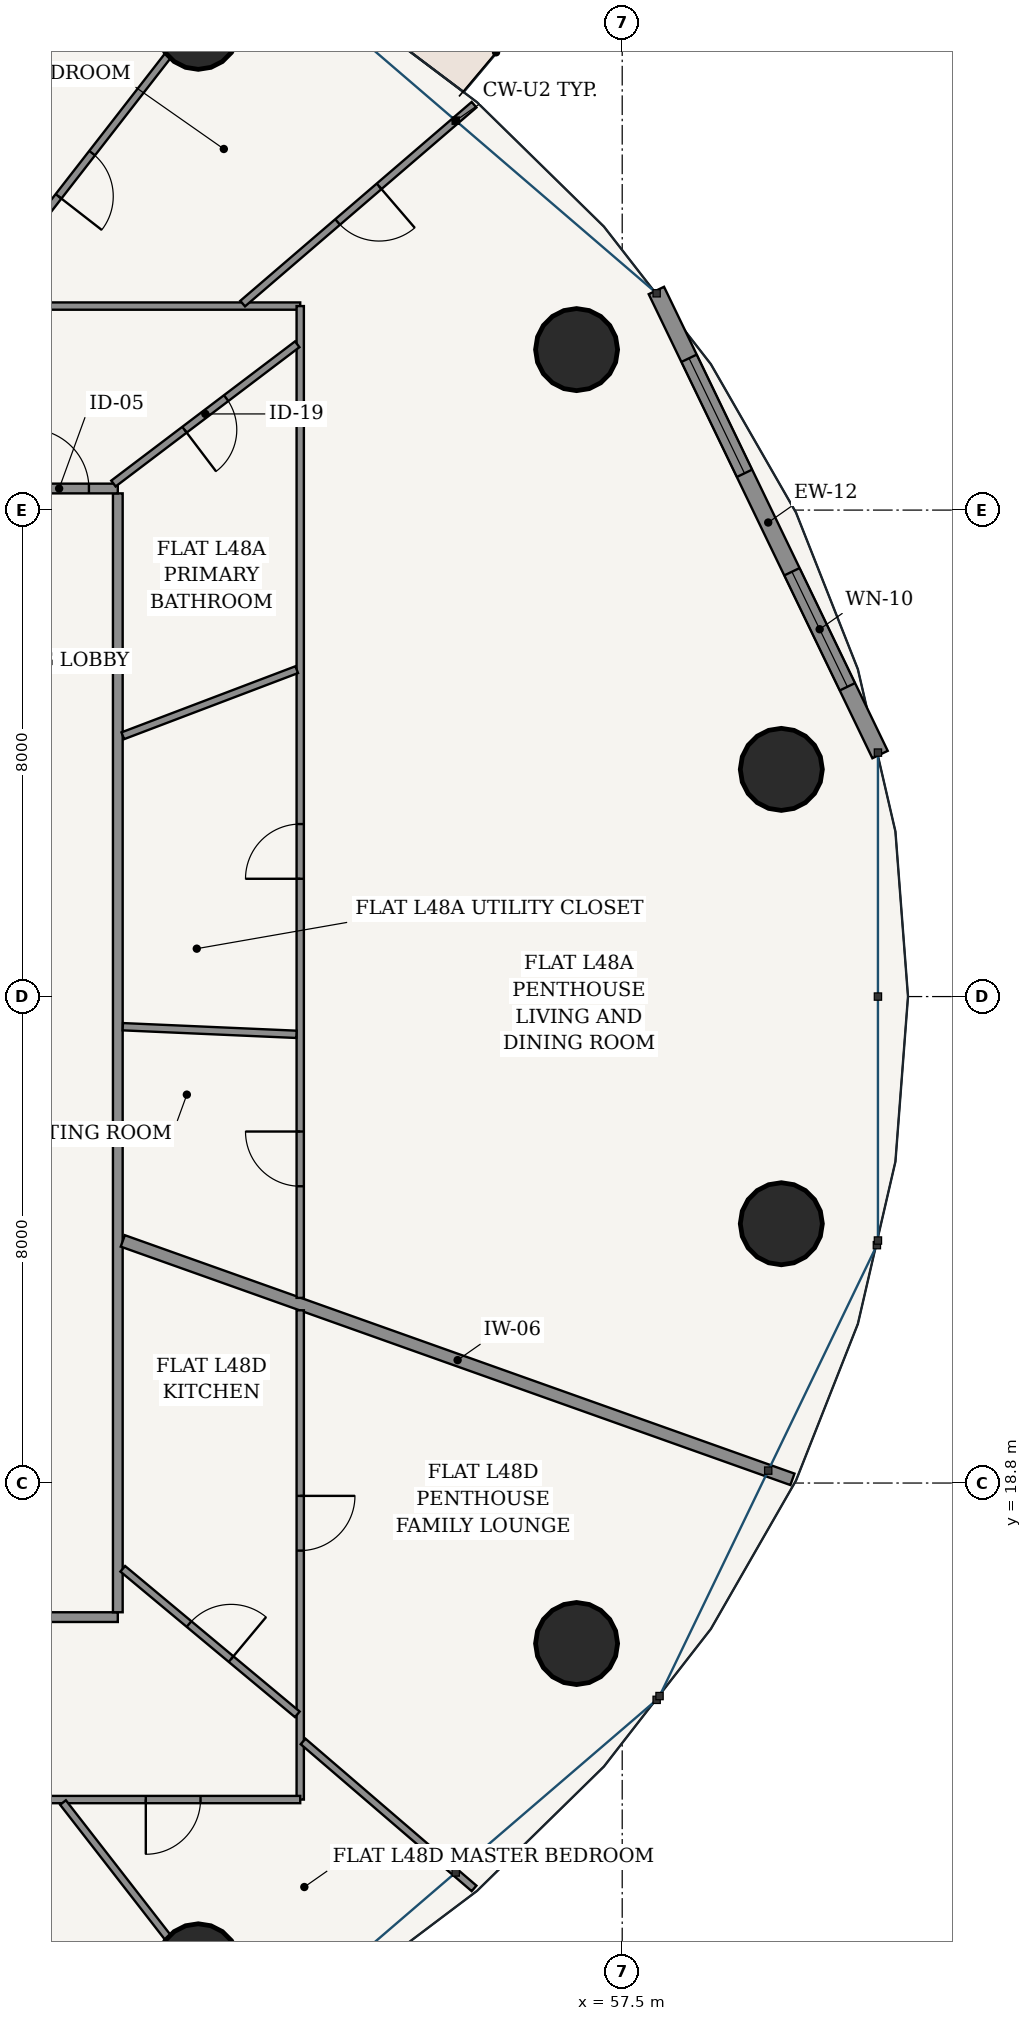
"""IFC4 building model, lengths in metres.
Left out: names, types, materials, properties, quantities, classifications, styles, units other than length and angle.
Written with IfcOpenShell. Run it as: python <this file> out.ifc"""

import sys

from ifc_helpers import new_model, si_unit, direction, frame, frame_2d, origin, origin_2d, place, context, subcontext, project, spatial, rectangle, hollow_circle, extrude, source, transform, mapped, element, fill, save


model = new_model("IFC4")
c1 = context("Model", 3, precision=1e-05, world=origin(), true_north=direction((-0.2419218956, 0.970295726276)))
c2 = subcontext(c1, "Body", "Model", "MODEL_VIEW")
j1 = project(units=[si_unit("LENGTHUNIT", "METRE"), si_unit("PLANEANGLEUNIT", "RADIAN")], contexts=[c1])
p1 = place(None, origin())
s1 = spatial("IfcSite", under=j1, at=p1, CompositionType="ELEMENT")
p2 = place(p1, origin())
s2 = spatial("IfcBuilding", under=s1, at=p2, CompositionType="ELEMENT")
p3 = place(p2, frame((0.0, 0.0, 182.2)))
s3 = spatial("IfcBuildingStorey", under=s2, at=p3, CompositionType="ELEMENT", Elevation=182.2)
for number, where, z_axis, x_axis in (
    (1, (60.117, 30.536, 0.0), (0.0, 0.0, 1.0), (1.0, 0.0, 0.0)),
    (2, (56.75, 37.439, 0.0), (0.0, 0.0, 1.0), (1.0, 0.0, 0.0)),
    (3, (50.528, 42.723, 0.0), (0.0, 0.0, 1.0), (1.0, 0.0, 0.0)),
    (4, (50.528, 10.877, 0.0), (0.0, 0.0, 1.0), (1.0, 0.0, 0.0)),
    (5, (56.75, 16.161, 0.0), (0.0, 0.0, 1.0), (1.0, 0.0, 0.0)),
    (6, (60.117, 23.064, 0.0), (0.0, 0.0, 1.0), (1.0, 0.0, 0.0)),
):
    element("IfcColumn", number, at=place(p3, frame(where, z_axis=z_axis, x_axis=x_axis)), inside=s3, PredefinedType="COLUMN", context=c2, shape_type="SweptSolid", body=[
        extrude(hollow_circle(Radius=0.675, WallThickness=0.042, at=origin_2d()), origin(), (0.0, 0.0, 1.0), 3.6),
    ])
p4 = place(p3, frame((61.74, 30.78, 0.0), z_axis=(0.0, 0.0, 1.0), x_axis=(-0.434209827226, 0.900811759437, 0.0)))
e7 = element("IfcWall", 7, at=p4, inside=s3, PredefinedType="SOLIDWALL", context=c2, shape_type="SweptSolid", body=[
    extrude(rectangle(XDim=8.472, YDim=0.28, at=frame_2d((4.236, 0.0))), origin(), (0.0, 0.0, 1.0), 3.15),
])
p5 = place(p4, frame((1.237, 0.0, 0.85)))
e8 = element("IfcOpeningElement", 8, at=p5, cuts=e7, PredefinedType="OPENING", context=c2, shape_type="SweptSolid", body=[
    extrude(rectangle(XDim=2.1, YDim=1.95, at=frame_2d((1.05, 0.975))), frame((0.0, 0.15, 0.0), z_axis=(0.0, -1.0, 0.0), x_axis=(1.0, 0.0, 0.0)), (0.0, 0.0, 1.0), 0.3),
])
p6 = place(p4, frame((5.134, 0.0, 0.85)))
e9 = element("IfcOpeningElement", 9, at=p6, cuts=e7, PredefinedType="OPENING", context=c2, shape_type="SweptSolid", body=[
    extrude(rectangle(XDim=2.1, YDim=1.95, at=frame_2d((1.05, 0.975))), frame((0.0, 0.15, 0.0), z_axis=(0.0, -1.0, 0.0), x_axis=(1.0, 0.0, 0.0)), (0.0, 0.0, 1.0), 0.3),
])
p7 = place(p3, frame((34.32, 16.595, 0.0), z_axis=(0.0, 0.0, 1.0), x_axis=(1.0, 0.0, 0.0)))
e10 = element("IfcWall", 10, at=p7, inside=s3, PredefinedType="PARTITIONING", context=c2, shape_type="SweptSolid", body=[
    extrude(rectangle(XDim=14.885, YDim=0.16, at=frame_2d((7.442, 0.0))), origin(), (0.0, 0.0, 1.0), 2.666),
])
p8 = place(p7, frame((10.026, 0.0, 0.0)))
e11 = element("IfcOpeningElement", 11, at=p8, cuts=e10, PredefinedType="OPENING", context=c2, shape_type="SweptSolid", body=[
    extrude(rectangle(XDim=0.98, YDim=2.2, at=frame_2d((0.49, 1.1))), frame((0.0, 0.09, 0.0), z_axis=(0.0, -1.0, 0.0), x_axis=(1.0, 0.0, 0.0)), (0.0, 0.0, 1.0), 0.18),
])
p9 = place(p3, frame((49.205, 16.675, 0.0), z_axis=(0.0, 0.0, 1.0), x_axis=(0.0, 1.0, 0.0)))
e12 = element("IfcWall", 12, at=p9, inside=s3, PredefinedType="PARTITIONING", context=c2, shape_type="SweptSolid", body=[
    extrude(rectangle(XDim=18.4, YDim=0.16, at=frame_2d((9.2, 0.0))), origin(), (0.0, 0.0, 1.0), 2.666),
])
p10 = place(p3, frame((47.275, 35.155, 0.0), z_axis=(0.0, 0.0, 1.0), x_axis=(1.0, 0.0, 0.0)))
e13 = element("IfcWall", 13, at=p10, inside=s3, PredefinedType="PARTITIONING", context=c2, shape_type="SweptSolid", body=[
    extrude(rectangle(XDim=1.93, YDim=0.16, at=frame_2d((0.965, 0.0))), origin(), (0.0, 0.0, 1.0), 3.15),
])
p11 = place(p10, frame((0.475, 0.0, 0.0)))
e14 = element("IfcOpeningElement", 14, at=p11, cuts=e13, PredefinedType="OPENING", context=c2, shape_type="SweptSolid", body=[
    extrude(rectangle(XDim=0.98, YDim=2.2, at=frame_2d((0.49, 1.1))), frame((0.0, 0.09, 0.0), z_axis=(0.0, -1.0, 0.0), x_axis=(1.0, 0.0, 0.0)), (0.0, 0.0, 1.0), 0.18),
])
p12 = place(p3, frame((49.287, 22.782, 0.0), z_axis=(0.0, 0.0, 1.0), x_axis=(0.942076460895, -0.335398183996, 0.0)))
e15 = element("IfcWall", 15, at=p12, inside=s3, PredefinedType="PARTITIONING", context=c2, shape_type="SweptSolid", body=[
    extrude(rectangle(XDim=11.689, YDim=0.2, at=frame_2d((5.845, 0.0))), origin(), (0.0, 0.0, 1.0), 2.666),
])
p13 = place(p3, frame((44.195, 38.155, 0.0), z_axis=(0.0, 0.0, 1.0), x_axis=(1.0, 0.0, 0.0)))
e16 = element("IfcWall", 16, at=p13, inside=s3, PredefinedType="PARTITIONING", context=c2, shape_type="SweptSolid", body=[
    extrude(rectangle(XDim=8.01, YDim=0.12, at=frame_2d((4.005, 0.0))), origin(), (0.0, 0.0, 1.0), 2.666),
])
p14 = place(p13, frame((1.018, 0.0, 0.0)))
e17 = element("IfcOpeningElement", 17, at=p14, cuts=e16, PredefinedType="OPENING", context=c2, shape_type="SweptSolid", body=[
    extrude(rectangle(XDim=0.9, YDim=2.15, at=frame_2d((0.45, 1.075))), frame((0.0, 0.07, 0.0), z_axis=(0.0, -1.0, 0.0), x_axis=(1.0, 0.0, 0.0)), (0.0, 0.0, 1.0), 0.14),
])
p15 = place(p3, frame((52.205, 38.155, 0.0), z_axis=(0.0, 0.0, 1.0), x_axis=(0.0, -1.0, 0.0)))
e18 = element("IfcWall", 18, at=p15, inside=s3, PredefinedType="PARTITIONING", context=c2, shape_type="SweptSolid", body=[
    extrude(rectangle(XDim=16.31, YDim=0.12, at=frame_2d((8.155, 0.0))), origin(), (0.0, 0.0, 1.0), 2.666),
])
p16 = place(p15, frame((13.574, 0.0, 0.0)))
e19 = element("IfcOpeningElement", 19, at=p16, cuts=e18, PredefinedType="OPENING", context=c2, shape_type="SweptSolid", body=[
    extrude(rectangle(XDim=0.9, YDim=2.15, at=frame_2d((0.45, 1.075))), frame((0.0, 0.07, 0.0), z_axis=(0.0, -1.0, 0.0), x_axis=(1.0, 0.0, 0.0)), (0.0, 0.0, 1.0), 0.14),
])
p17 = place(p15, frame((8.518, 0.0, 0.0)))
e20 = element("IfcOpeningElement", 20, at=p17, cuts=e18, PredefinedType="OPENING", context=c2, shape_type="SweptSolid", body=[
    extrude(rectangle(XDim=0.9, YDim=2.15, at=frame_2d((0.45, 1.075))), frame((0.0, 0.07, 0.0), z_axis=(0.0, -1.0, 0.0), x_axis=(1.0, 0.0, 0.0)), (0.0, 0.0, 1.0), 0.14),
])
p18 = place(p3, frame((51.258, 38.195, 0.0), z_axis=(0.0, 0.0, 1.0), x_axis=(0.758369880373, 0.651824458381, 0.0)))
e21 = element("IfcWall", 21, at=p18, inside=s3, PredefinedType="PARTITIONING", context=c2, shape_type="SweptSolid", body=[
    extrude(rectangle(XDim=5.018, YDim=0.12, at=frame_2d((2.509, 0.0))), origin(), (0.0, 0.0, 1.0), 2.666),
])
p19 = place(p18, frame((2.059, 0.0, 0.0)))
e22 = element("IfcOpeningElement", 22, at=p19, cuts=e21, PredefinedType="OPENING", context=c2, shape_type="SweptSolid", body=[
    extrude(rectangle(XDim=0.9, YDim=2.15, at=frame_2d((0.45, 1.075))), frame((0.0, 0.07, 0.0), z_axis=(0.0, -1.0, 0.0), x_axis=(1.0, 0.0, 0.0)), (0.0, 0.0, 1.0), 0.14),
])
p20 = place(p3, frame((46.865, 38.204, 0.0), z_axis=(0.0, 0.0, 1.0), x_axis=(0.613754405153, 0.789497010859, 0.0)))
e23 = element("IfcWall", 23, at=p20, inside=s3, PredefinedType="PARTITIONING", context=c2, shape_type="SweptSolid", body=[
    extrude(rectangle(XDim=7.353, YDim=0.12, at=frame_2d((3.677, 0.0))), origin(), (0.0, 0.0, 1.0), 2.5),
])
p21 = place(p20, frame((2.224, 0.0, 0.0)))
e24 = element("IfcOpeningElement", 24, at=p21, cuts=e23, PredefinedType="OPENING", context=c2, shape_type="SweptSolid", body=[
    extrude(rectangle(XDim=0.9, YDim=2.15, at=frame_2d((0.45, 1.075))), frame((0.0, 0.07, 0.0), z_axis=(0.0, -1.0, 0.0), x_axis=(1.0, 0.0, 0.0)), (0.0, 0.0, 1.0), 0.14),
])
p22 = place(p3, frame((49.287, 26.304, 0.0), z_axis=(0.0, 0.0, 1.0), x_axis=(0.999039813392, -0.043811542509, 0.0)))
e25 = element("IfcWall", 25, at=p22, inside=s3, PredefinedType="PARTITIONING", context=c2, shape_type="SweptSolid", body=[
    extrude(rectangle(XDim=2.859, YDim=0.12, at=frame_2d((1.429, 0.0))), origin(), (0.0, 0.0, 1.0), 3.15),
])
p23 = place(p3, frame((49.287, 31.089, 0.0), z_axis=(0.0, 0.0, 1.0), x_axis=(0.934802126635, 0.3551689514, 0.0)))
e26 = element("IfcWall", 26, at=p23, inside=s3, PredefinedType="PARTITIONING", context=c2, shape_type="SweptSolid", body=[
    extrude(rectangle(XDim=3.06, YDim=0.12, at=frame_2d((1.53, 0.0))), origin(), (0.0, 0.0, 1.0), 2.825),
])
p24 = place(p3, frame((49.133, 35.236, 0.0), z_axis=(0.0, 0.0, 1.0), x_axis=(0.797054583929, 0.603907269568, 0.0)))
e27 = element("IfcWall", 27, at=p24, inside=s3, PredefinedType="PARTITIONING", context=c2, shape_type="SweptSolid", body=[
    extrude(rectangle(XDim=3.792, YDim=0.12, at=frame_2d((1.896, 0.0))), origin(), (0.0, 0.0, 1.0), 2.825),
])
p25 = place(p24, frame((1.466, 0.0, 0.0)))
e28 = element("IfcOpeningElement", 28, at=p25, cuts=e27, PredefinedType="OPENING", context=c2, shape_type="SweptSolid", body=[
    extrude(rectangle(XDim=0.86, YDim=2.15, at=frame_2d((0.43, 1.075))), frame((0.0, 0.07, 0.0), z_axis=(0.0, -1.0, 0.0), x_axis=(1.0, 0.0, 0.0)), (0.0, 0.0, 1.0), 0.14),
])
p26 = place(p3, frame((52.205, 21.641, 0.0), z_axis=(0.0, 0.0, 1.0), x_axis=(0.0, -1.0, 0.0)))
e29 = element("IfcWall", 29, at=p26, inside=s3, PredefinedType="PARTITIONING", context=c2, shape_type="SweptSolid", body=[
    extrude(rectangle(XDim=8.046, YDim=0.12, at=frame_2d((4.023, 0.0))), origin(), (0.0, 0.0, 1.0), 2.666),
])
p27 = place(p26, frame((3.052, 0.0, 0.0)))
e30 = element("IfcOpeningElement", 30, at=p27, cuts=e29, PredefinedType="OPENING", context=c2, shape_type="SweptSolid", body=[
    extrude(rectangle(XDim=0.9, YDim=2.15, at=frame_2d((0.45, 1.075))), frame((0.0, 0.07, 0.0), z_axis=(0.0, -1.0, 0.0), x_axis=(1.0, 0.0, 0.0)), (0.0, 0.0, 1.0), 0.14),
])
p28 = place(p3, frame((52.205, 13.595, 0.0), z_axis=(0.0, 0.0, 1.0), x_axis=(-1.0, 0.0, 0.0)))
e31 = element("IfcWall", 31, at=p28, inside=s3, PredefinedType="PARTITIONING", context=c2, shape_type="SweptSolid", body=[
    extrude(rectangle(XDim=17.159, YDim=0.12, at=frame_2d((8.58, 0.0))), origin(), (0.0, 0.0, 1.0), 2.666),
])
p29 = place(p28, frame((6.879, 0.0, 0.0)))
e32 = element("IfcOpeningElement", 32, at=p29, cuts=e31, PredefinedType="OPENING", context=c2, shape_type="SweptSolid", body=[
    extrude(rectangle(XDim=0.9, YDim=2.15, at=frame_2d((0.45, 1.075))), frame((0.0, 0.07, 0.0), z_axis=(0.0, -1.0, 0.0), x_axis=(1.0, 0.0, 0.0)), (0.0, 0.0, 1.0), 0.14),
])
p30 = place(p28, frame((1.64, 0.0, 0.0)))
e33 = element("IfcOpeningElement", 33, at=p30, cuts=e31, PredefinedType="OPENING", context=c2, shape_type="SweptSolid", body=[
    extrude(rectangle(XDim=0.9, YDim=2.15, at=frame_2d((0.45, 1.075))), frame((0.0, 0.07, 0.0), z_axis=(0.0, -1.0, 0.0), x_axis=(1.0, 0.0, 0.0)), (0.0, 0.0, 1.0), 0.14),
])
p31 = place(p3, frame((48.304, 13.546, 0.0), z_axis=(0.0, 0.0, 1.0), x_axis=(0.613734792328, -0.789512257464, 0.0)))
e34 = element("IfcWall", 34, at=p31, inside=s3, PredefinedType="PARTITIONING", context=c2, shape_type="SweptSolid", body=[
    extrude(rectangle(XDim=5.01, YDim=0.12, at=frame_2d((2.505, 0.0))), origin(), (0.0, 0.0, 1.0), 2.5),
])
p32 = place(p3, frame((52.252, 14.55, 0.0), z_axis=(0.0, 0.0, 1.0), x_axis=(0.758368113794, -0.651826513714, 0.0)))
e35 = element("IfcWall", 35, at=p32, inside=s3, PredefinedType="PARTITIONING", context=c2, shape_type="SweptSolid", body=[
    extrude(rectangle(XDim=3.708, YDim=0.12, at=frame_2d((1.854, 0.0))), origin(), (0.0, 0.0, 1.0), 2.666),
])
p33 = place(p3, frame((49.287, 17.39, 0.0), z_axis=(0.0, 0.0, 1.0), x_axis=(0.768065994597, -0.640370695725, 0.0)))
e36 = element("IfcWall", 36, at=p33, inside=s3, PredefinedType="PARTITIONING", context=c2, shape_type="SweptSolid", body=[
    extrude(rectangle(XDim=3.738, YDim=0.12, at=frame_2d((1.869, 0.0))), origin(), (0.0, 0.0, 1.0), 2.825),
])
p34 = place(p33, frame((1.419, 0.0, 0.0)))
e37 = element("IfcOpeningElement", 37, at=p34, cuts=e36, PredefinedType="OPENING", context=c2, shape_type="SweptSolid", body=[
    extrude(rectangle(XDim=0.9, YDim=2.15, at=frame_2d((0.45, 1.075))), frame((0.0, 0.07, 0.0), z_axis=(0.0, -1.0, 0.0), x_axis=(1.0, 0.0, 0.0)), (0.0, 0.0, 1.0), 0.14),
])
m1 = source(origin(), c2, "Body", "SweptSolid", [
    extrude(rectangle(XDim=2.1, YDim=1.95, at=frame_2d((1.05, 0.975))), frame((0.0, 0.03, 0.0), z_axis=(0.0, -1.0, 0.0), x_axis=(1.0, 0.0, 0.0)), (0.0, 0.0, 1.0), 0.06),
])
p35 = place(p5, origin())
e38 = element("IfcWindow", 38, at=p35, inside=s3, PartitioningType="SINGLE_PANEL", PredefinedType="WINDOW", context=c2, shape_type="MappedRepresentation", body=[
    mapped(m1, transform((0.0, 0.0, 0.0), scale=1.0)),
])
fill(e8, e38)
p36 = place(p6, origin())
e39 = element("IfcWindow", 39, at=p36, inside=s3, PartitioningType="SINGLE_PANEL", PredefinedType="WINDOW", context=c2, shape_type="MappedRepresentation", body=[
    mapped(m1, transform((0.0, 0.0, 0.0), scale=1.0)),
])
fill(e9, e39)
m2 = source(origin(), c2, "Body", "SweptSolid", [
    extrude(rectangle(XDim=0.98, YDim=2.2, at=frame_2d((0.49, 1.1))), frame((0.0, 0.025, 0.0), z_axis=(0.0, -1.0, 0.0), x_axis=(1.0, 0.0, 0.0)), (0.0, 0.0, 1.0), 0.05),
])
p37 = place(p11, origin())
e40 = element("IfcDoor", 40, at=p37, inside=s3, OperationType="SINGLE_SWING_LEFT", PredefinedType="DOOR", context=c2, shape_type="MappedRepresentation", body=[
    mapped(m2, transform((0.0, 0.0, 0.0), scale=1.0)),
])
fill(e14, e40)
m3 = source(origin(), c2, "Body", "SweptSolid", [
    extrude(rectangle(XDim=0.86, YDim=2.15, at=frame_2d((0.43, 1.075))), frame((0.0, 0.025, 0.0), z_axis=(0.0, -1.0, 0.0), x_axis=(1.0, 0.0, 0.0)), (0.0, 0.0, 1.0), 0.05),
])
p38 = place(p25, frame((0.86, 0.0, 0.0), z_axis=(0.0, 0.0, 1.0), x_axis=(-1.0, 0.0, 0.0)))
e41 = element("IfcDoor", 41, at=p38, inside=s3, OperationType="SINGLE_SWING_RIGHT", PredefinedType="DOOR", context=c2, shape_type="MappedRepresentation", body=[
    mapped(m3, transform((0.0, 0.0, 0.0), scale=1.0)),
])
fill(e28, e41)
m4 = source(origin(), c2, "Body", "SweptSolid", [
    extrude(rectangle(XDim=0.9, YDim=2.15, at=frame_2d((0.45, 1.075))), frame((0.0, 0.025, 0.0), z_axis=(0.0, -1.0, 0.0), x_axis=(1.0, 0.0, 0.0)), (0.0, 0.0, 1.0), 0.05),
])
p39 = place(p21, frame((0.9, 0.0, 0.0), z_axis=(0.0, 0.0, 1.0), x_axis=(-1.0, 0.0, 0.0)))
e42 = element("IfcDoor", 42, at=p39, inside=s3, OperationType="SINGLE_SWING_RIGHT", PredefinedType="DOOR", context=c2, shape_type="MappedRepresentation", body=[
    mapped(m4, transform((0.0, 0.0, 0.0), scale=1.0)),
])
fill(e24, e42)
p40 = place(p19, frame((0.9, 0.0, 0.0), z_axis=(0.0, 0.0, 1.0), x_axis=(-1.0, 0.0, 0.0)))
e43 = element("IfcDoor", 43, at=p40, inside=s3, OperationType="SINGLE_SWING_LEFT", PredefinedType="DOOR", context=c2, shape_type="MappedRepresentation", body=[
    mapped(m4, transform((0.0, 0.0, 0.0), scale=1.0)),
])
fill(e22, e43)
p41 = place(p16, frame((0.9, 0.0, 0.0), z_axis=(0.0, 0.0, 1.0), x_axis=(-1.0, 0.0, 0.0)))
e44 = element("IfcDoor", 44, at=p41, inside=s3, OperationType="SINGLE_SWING_RIGHT", PredefinedType="DOOR", context=c2, shape_type="MappedRepresentation", body=[
    mapped(m4, transform((0.0, 0.0, 0.0), scale=1.0)),
])
fill(e19, e44)
p42 = place(p17, frame((0.9, 0.0, 0.0), z_axis=(0.0, 0.0, 1.0), x_axis=(-1.0, 0.0, 0.0)))
e45 = element("IfcDoor", 45, at=p42, inside=s3, OperationType="SINGLE_SWING_LEFT", PredefinedType="DOOR", context=c2, shape_type="MappedRepresentation", body=[
    mapped(m4, transform((0.0, 0.0, 0.0), scale=1.0)),
])
fill(e20, e45)
p43 = place(p34, origin())
e46 = element("IfcDoor", 46, at=p43, inside=s3, OperationType="SINGLE_SWING_RIGHT", PredefinedType="DOOR", context=c2, shape_type="MappedRepresentation", body=[
    mapped(m4, transform((0.0, 0.0, 0.0), scale=1.0)),
])
fill(e37, e46)
p44 = place(p27, origin())
e47 = element("IfcDoor", 47, at=p44, inside=s3, OperationType="SINGLE_SWING_LEFT", PredefinedType="DOOR", context=c2, shape_type="MappedRepresentation", body=[
    mapped(m4, transform((0.0, 0.0, 0.0), scale=1.0)),
])
fill(e30, e47)
p45 = place(p30, origin())
e48 = element("IfcDoor", 48, at=p45, inside=s3, OperationType="SINGLE_SWING_RIGHT", PredefinedType="DOOR", context=c2, shape_type="MappedRepresentation", body=[
    mapped(m4, transform((0.0, 0.0, 0.0), scale=1.0)),
])
fill(e33, e48)
save(model, sys.argv[1])
